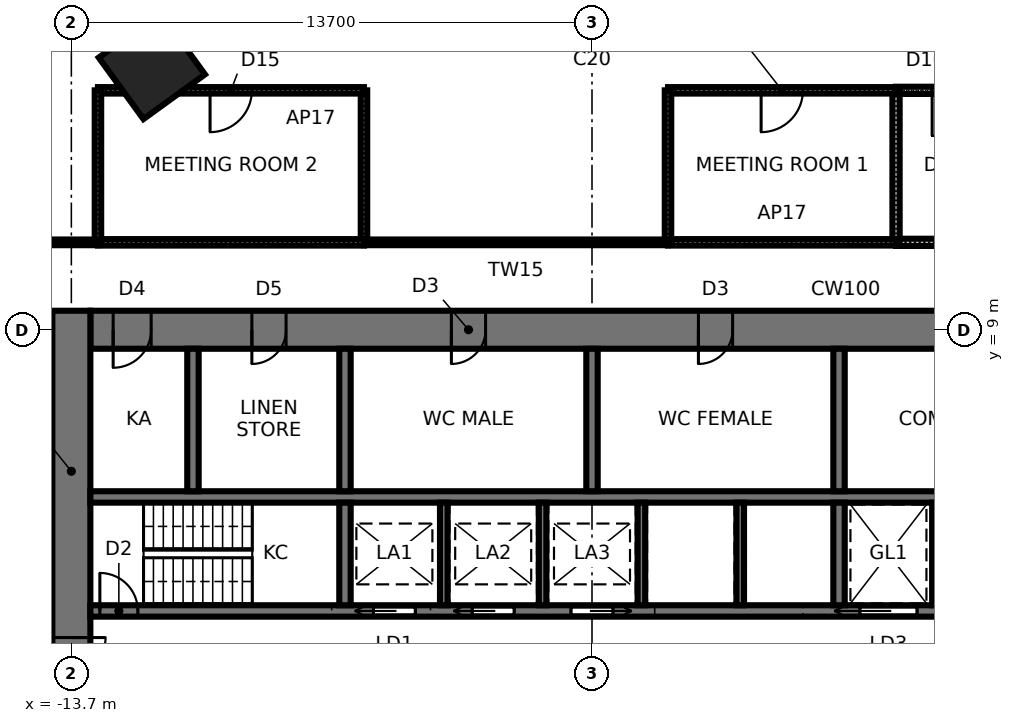
"""IFC4 building model, lengths in metres.
Left out: names, types, materials, properties, quantities, classifications, styles, units other than length and angle.
Written with IfcOpenShell. Run it as: python <this file> out.ifc"""

import sys

from ifc_helpers import new_model, si_unit, direction, frame, frame_2d, origin, origin_2d, place, context, subcontext, project, spatial, rectangle, extrude, element, fill, save


model = new_model("IFC4")
c1 = context("Model", 3, precision=1e-05, world=origin(), true_north=direction((0.0, 1.0)))
c2 = subcontext(c1, "Body", "Model", "MODEL_VIEW")
j1 = project(units=[si_unit("LENGTHUNIT", "METRE"), si_unit("PLANEANGLEUNIT", "RADIAN")], contexts=[c1])
p1 = place(None, origin())
s1 = spatial("IfcSite", under=j1, at=p1, CompositionType="ELEMENT")
p2 = place(p1, origin())
s2 = spatial("IfcBuilding", under=s1, at=p2, CompositionType="ELEMENT")
p3 = place(p2, frame((0.0, 0.0, 32.2)))
s3 = spatial("IfcBuildingStorey", under=s2, at=p3, CompositionType="ELEMENT", Elevation=32.2)
p4 = place(p3, frame((-11.581, 15.94, 0.0), z_axis=(0.0, 0.0, 1.0), x_axis=(-0.587785252292, 0.809016994375, 0.0)))
e1 = element("IfcColumn", 1, at=p4, inside=s3, PredefinedType="COLUMN", context=c2, shape_type="SweptSolid", body=[
    extrude(rectangle(XDim=2.0, YDim=2.0, at=origin_2d()), origin(), (0.0, 0.0, 1.0), 4.2),
])
p5 = place(p3, frame((13.2, 9.0, 0.0), z_axis=(0.0, 0.0, 1.0), x_axis=(-1.0, 0.0, 0.0)))
e2 = element("IfcWall", 2, at=p5, inside=s3, PredefinedType="SHEAR", context=c2, shape_type="SweptSolid", body=[
    extrude(rectangle(XDim=26.4, YDim=1.0, at=frame_2d((13.2, 0.0))), origin(), (0.0, 0.0, 1.0), 4.2),
])
p6 = place(p5, frame((2.65, 0.0, 0.0)))
e3 = element("IfcOpeningElement", 3, at=p6, cuts=e2, PredefinedType="OPENING", context=c2, shape_type="SweptSolid", body=[
    extrude(rectangle(XDim=0.9, YDim=2.1, at=frame_2d((0.45, 1.05))), frame((0.0, 0.51, 0.0), z_axis=(0.0, -1.0, 0.0), x_axis=(1.0, 0.0, 0.0)), (0.0, 0.0, 1.0), 1.02),
])
p7 = place(p5, frame((9.5, 0.0, 0.0)))
e4 = element("IfcOpeningElement", 4, at=p7, cuts=e2, PredefinedType="OPENING", context=c2, shape_type="SweptSolid", body=[
    extrude(rectangle(XDim=0.9, YDim=2.1, at=frame_2d((0.45, 1.05))), frame((0.0, 0.51, 0.0), z_axis=(0.0, -1.0, 0.0), x_axis=(1.0, 0.0, 0.0)), (0.0, 0.0, 1.0), 1.02),
])
p8 = place(p5, frame((16.0, 0.0, 0.0)))
e5 = element("IfcOpeningElement", 5, at=p8, cuts=e2, PredefinedType="OPENING", context=c2, shape_type="SweptSolid", body=[
    extrude(rectangle(XDim=0.9, YDim=2.1, at=frame_2d((0.45, 1.05))), frame((0.0, 0.51, 0.0), z_axis=(0.0, -1.0, 0.0), x_axis=(1.0, 0.0, 0.0)), (0.0, 0.0, 1.0), 1.02),
])
p9 = place(p5, frame((21.25, 0.0, 0.0)))
e6 = element("IfcOpeningElement", 6, at=p9, cuts=e2, PredefinedType="OPENING", context=c2, shape_type="SweptSolid", body=[
    extrude(rectangle(XDim=0.9, YDim=2.1, at=frame_2d((0.45, 1.05))), frame((0.0, 0.51, 0.0), z_axis=(0.0, -1.0, 0.0), x_axis=(1.0, 0.0, 0.0)), (0.0, 0.0, 1.0), 1.02),
])
p10 = place(p5, frame((24.8, 0.0, 0.0)))
e7 = element("IfcOpeningElement", 7, at=p10, cuts=e2, PredefinedType="OPENING", context=c2, shape_type="SweptSolid", body=[
    extrude(rectangle(XDim=1.0, YDim=2.1, at=frame_2d((0.5, 1.05))), frame((0.0, 0.51, 0.0), z_axis=(0.0, -1.0, 0.0), x_axis=(1.0, 0.0, 0.0)), (0.0, 0.0, 1.0), 1.02),
])
p11 = place(p3, frame((-13.7, 9.5, 0.0), z_axis=(0.0, 0.0, 1.0), x_axis=(0.0, -1.0, 0.0)))
e8 = element("IfcWall", 8, at=p11, inside=s3, PredefinedType="SHEAR", context=c2, shape_type="SweptSolid", body=[
    extrude(rectangle(XDim=19.0, YDim=1.0, at=frame_2d((9.5, 0.0))), origin(), (0.0, 0.0, 1.0), 4.2),
])
p12 = place(p11, frame((8.6, 0.0, 0.0)))
e9 = element("IfcOpeningElement", 9, at=p12, cuts=e8, PredefinedType="OPENING", context=c2, shape_type="SweptSolid", body=[
    extrude(rectangle(XDim=1.8, YDim=2.4, at=frame_2d((0.9, 1.2))), frame((0.0, 0.51, 0.0), z_axis=(0.0, -1.0, 0.0), x_axis=(1.0, 0.0, 0.0)), (0.0, 0.0, 1.0), 1.02),
])
p13 = place(p3, frame((-13.2, 1.6, 0.0), z_axis=(0.0, 0.0, 1.0), x_axis=(1.0, 0.0, 0.0)))
e10 = element("IfcWall", 10, at=p13, inside=s3, PredefinedType="SHEAR", context=c2, shape_type="SweptSolid", body=[
    extrude(rectangle(XDim=26.4, YDim=0.3, at=frame_2d((13.2, 0.0))), origin(), (0.0, 0.0, 1.0), 4.2),
])
p14 = place(p13, frame((0.25, 0.0, 0.0)))
e11 = element("IfcOpeningElement", 11, at=p14, cuts=e10, PredefinedType="OPENING", context=c2, shape_type="SweptSolid", body=[
    extrude(rectangle(XDim=1.0, YDim=2.1, at=frame_2d((0.5, 1.05))), frame((0.0, 0.16, 0.0), z_axis=(0.0, -1.0, 0.0), x_axis=(1.0, 0.0, 0.0)), (0.0, 0.0, 1.0), 0.32),
])
p15 = place(p13, frame((20.25, 0.0, 0.0)))
e12 = element("IfcOpeningElement", 12, at=p15, cuts=e10, PredefinedType="OPENING", context=c2, shape_type="SweptSolid", body=[
    extrude(rectangle(XDim=1.5, YDim=2.4, at=frame_2d((0.75, 1.2))), frame((0.0, 0.16, 0.0), z_axis=(0.0, -1.0, 0.0), x_axis=(1.0, 0.0, 0.0)), (0.0, 0.0, 1.0), 0.32),
])
p16 = place(p13, frame((7.45, 0.0, 0.0)))
e13 = element("IfcOpeningElement", 13, at=p16, cuts=e10, PredefinedType="OPENING", context=c2, shape_type="SweptSolid", body=[
    extrude(rectangle(XDim=1.1, YDim=2.3, at=frame_2d((0.55, 1.15))), frame((0.0, 0.16, 0.0), z_axis=(0.0, -1.0, 0.0), x_axis=(1.0, 0.0, 0.0)), (0.0, 0.0, 1.0), 0.32),
])
p17 = place(p13, frame((10.05, 0.0, 0.0)))
e14 = element("IfcOpeningElement", 14, at=p17, cuts=e10, PredefinedType="OPENING", context=c2, shape_type="SweptSolid", body=[
    extrude(rectangle(XDim=1.1, YDim=2.3, at=frame_2d((0.55, 1.15))), frame((0.0, 0.16, 0.0), z_axis=(0.0, -1.0, 0.0), x_axis=(1.0, 0.0, 0.0)), (0.0, 0.0, 1.0), 0.32),
])
p18 = place(p13, frame((12.65, 0.0, 0.0)))
e15 = element("IfcOpeningElement", 15, at=p18, cuts=e10, PredefinedType="OPENING", context=c2, shape_type="SweptSolid", body=[
    extrude(rectangle(XDim=1.1, YDim=2.3, at=frame_2d((0.55, 1.15))), frame((0.0, 0.16, 0.0), z_axis=(0.0, -1.0, 0.0), x_axis=(1.0, 0.0, 0.0)), (0.0, 0.0, 1.0), 0.32),
])
p19 = place(p13, frame((24.15, 0.0, 0.0)))
e16 = element("IfcOpeningElement", 16, at=p19, cuts=e10, PredefinedType="OPENING", context=c2, shape_type="SweptSolid", body=[
    extrude(rectangle(XDim=0.9, YDim=2.1, at=frame_2d((0.45, 1.05))), frame((0.0, 0.16, 0.0), z_axis=(0.0, -1.0, 0.0), x_axis=(1.0, 0.0, 0.0)), (0.0, 0.0, 1.0), 0.32),
])
p20 = place(p3, frame((-13.2, 4.6, 0.0), z_axis=(0.0, 0.0, 1.0), x_axis=(1.0, 0.0, 0.0)))
e17 = element("IfcWall", 17, at=p20, inside=s3, PredefinedType="SHEAR", context=c2, shape_type="SweptSolid", body=[
    extrude(rectangle(XDim=26.4, YDim=0.3, at=frame_2d((13.2, 0.0))), origin(), (0.0, 0.0, 1.0), 4.2),
])
p21 = place(p3, frame((-6.5, 1.75, 0.0), z_axis=(0.0, 0.0, 1.0), x_axis=(0.0, 1.0, 0.0)))
e18 = element("IfcWall", 18, at=p21, inside=s3, PredefinedType="SHEAR", context=c2, shape_type="SweptSolid", body=[
    extrude(rectangle(XDim=2.7, YDim=0.3, at=frame_2d((1.35, 0.0))), origin(), (0.0, 0.0, 1.0), 4.2),
])
p22 = place(p3, frame((-6.5, 4.75, 0.0), z_axis=(0.0, 0.0, 1.0), x_axis=(0.0, 1.0, 0.0)))
e19 = element("IfcWall", 19, at=p22, inside=s3, PredefinedType="SHEAR", context=c2, shape_type="SweptSolid", body=[
    extrude(rectangle(XDim=3.75, YDim=0.3, at=frame_2d((1.875, 0.0))), origin(), (0.0, 0.0, 1.0), 4.2),
])
p23 = place(p3, frame((6.5, 1.75, 0.0), z_axis=(0.0, 0.0, 1.0), x_axis=(0.0, 1.0, 0.0)))
e20 = element("IfcWall", 20, at=p23, inside=s3, PredefinedType="SHEAR", context=c2, shape_type="SweptSolid", body=[
    extrude(rectangle(XDim=2.7, YDim=0.3, at=frame_2d((1.35, 0.0))), origin(), (0.0, 0.0, 1.0), 4.2),
])
p24 = place(p3, frame((6.5, 4.75, 0.0), z_axis=(0.0, 0.0, 1.0), x_axis=(0.0, 1.0, 0.0)))
e21 = element("IfcWall", 21, at=p24, inside=s3, PredefinedType="SHEAR", context=c2, shape_type="SweptSolid", body=[
    extrude(rectangle(XDim=3.75, YDim=0.3, at=frame_2d((1.875, 0.0))), origin(), (0.0, 0.0, 1.0), 4.2),
])
for number, where, z_axis, x_axis in (
    (22, (-3.9, 1.75, 0.0), (0.0, 0.0, 1.0), (0.0, 1.0, 0.0)),
    (23, (-1.3, 1.75, 0.0), (0.0, 0.0, 1.0), (0.0, 1.0, 0.0)),
    (24, (1.3, 1.75, 0.0), (0.0, 0.0, 1.0), (0.0, 1.0, 0.0)),
    (25, (3.9, 1.75, 0.0), (0.0, 0.0, 1.0), (0.0, 1.0, 0.0)),
):
    element("IfcWall", number, at=place(p3, frame(where, z_axis=z_axis, x_axis=x_axis)), inside=s3, PredefinedType="SHEAR", context=c2, shape_type="SweptSolid", body=[
        extrude(rectangle(XDim=2.7, YDim=0.2, at=frame_2d((1.35, 0.0))), origin(), (0.0, 0.0, 1.0), 4.2),
    ])
for number, where, z_axis, x_axis in (
    (26, (0.0, 4.75, 0.0), (0.0, 0.0, 1.0), (0.0, 1.0, 0.0)),
    (27, (-10.5, 4.75, 0.0), (0.0, 0.0, 1.0), (0.0, 1.0, 0.0)),
):
    element("IfcWall", number, at=place(p3, frame(where, z_axis=z_axis, x_axis=x_axis)), inside=s3, PredefinedType="SHEAR", context=c2, shape_type="SweptSolid", body=[
        extrude(rectangle(XDim=3.75, YDim=0.3, at=frame_2d((1.875, 0.0))), origin(), (0.0, 0.0, 1.0), 4.2),
    ])
p25 = place(p3, frame((9.1, 1.75, 0.0), z_axis=(0.0, 0.0, 1.0), x_axis=(0.0, 1.0, 0.0)))
e28 = element("IfcWall", 28, at=p25, inside=s3, PredefinedType="SHEAR", context=c2, shape_type="SweptSolid", body=[
    extrude(rectangle(XDim=2.7, YDim=0.3, at=frame_2d((1.35, 0.0))), origin(), (0.0, 0.0, 1.0), 4.2),
])
p26 = place(p3, frame((8.0, 11.3, 0.0), z_axis=(0.0, 0.0, 1.0), x_axis=(1.0, 0.0, 0.0)))
e29 = element("IfcWall", 29, at=p26, inside=s3, PredefinedType="SOLIDWALL", context=c2, shape_type="SweptSolid", body=[
    extrude(rectangle(XDim=5.0, YDim=0.19, at=frame_2d((2.5, 0.0))), origin(), (0.0, 0.0, 1.0), 4.04),
])
p27 = place(p3, frame((13.0, 15.3, 0.0), z_axis=(0.0, 0.0, 1.0), x_axis=(-1.0, 0.0, 0.0)))
e30 = element("IfcWall", 30, at=p27, inside=s3, PredefinedType="SOLIDWALL", context=c2, shape_type="SweptSolid", body=[
    extrude(rectangle(XDim=5.0, YDim=0.19, at=frame_2d((2.5, 0.0))), origin(), (0.0, 0.0, 1.0), 4.04),
])
p28 = place(p27, frame((2.85, 0.0, 0.0)))
e31 = element("IfcOpeningElement", 31, at=p28, cuts=e30, PredefinedType="OPENING", context=c2, shape_type="SweptSolid", body=[
    extrude(rectangle(XDim=1.2, YDim=2.1, at=frame_2d((0.6, 1.05))), frame((0.0, 0.105, 0.0), z_axis=(0.0, -1.0, 0.0), x_axis=(1.0, 0.0, 0.0)), (0.0, 0.0, 1.0), 0.21),
])
p29 = place(p3, frame((8.0, 15.3, 0.0), z_axis=(0.0, 0.0, 1.0), x_axis=(0.0, -1.0, 0.0)))
e32 = element("IfcWall", 32, at=p29, inside=s3, PredefinedType="SOLIDWALL", context=c2, shape_type="SweptSolid", body=[
    extrude(rectangle(XDim=4.0, YDim=0.19, at=frame_2d((2.0, 0.0))), origin(), (0.0, 0.0, 1.0), 4.04),
])
p30 = place(p3, frame((2.0, 11.3, 0.0), z_axis=(0.0, 0.0, 1.0), x_axis=(1.0, 0.0, 0.0)))
e33 = element("IfcWall", 33, at=p30, inside=s3, PredefinedType="PARTITIONING", context=c2, shape_type="SweptSolid", body=[
    extrude(rectangle(XDim=6.0, YDim=0.17, at=frame_2d((3.0, 0.0))), origin(), (0.0, 0.0, 1.0), 4.04),
])
p31 = place(p3, frame((8.0, 15.3, 0.0), z_axis=(0.0, 0.0, 1.0), x_axis=(-1.0, 0.0, 0.0)))
e34 = element("IfcWall", 34, at=p31, inside=s3, PredefinedType="PARTITIONING", context=c2, shape_type="SweptSolid", body=[
    extrude(rectangle(XDim=6.0, YDim=0.17, at=frame_2d((3.0, 0.0))), origin(), (0.0, 0.0, 1.0), 4.04),
])
p32 = place(p31, frame((2.45, 0.0, 0.0)))
e35 = element("IfcOpeningElement", 35, at=p32, cuts=e34, PredefinedType="OPENING", context=c2, shape_type="SweptSolid", body=[
    extrude(rectangle(XDim=1.1, YDim=2.4, at=frame_2d((0.55, 1.2))), frame((0.0, 0.095, 0.0), z_axis=(0.0, -1.0, 0.0), x_axis=(1.0, 0.0, 0.0)), (0.0, 0.0, 1.0), 0.19),
])
p33 = place(p3, frame((2.0, 15.3, 0.0), z_axis=(0.0, 0.0, 1.0), x_axis=(0.0, -1.0, 0.0)))
e36 = element("IfcWall", 36, at=p33, inside=s3, PredefinedType="PARTITIONING", context=c2, shape_type="SweptSolid", body=[
    extrude(rectangle(XDim=4.0, YDim=0.17, at=frame_2d((2.0, 0.0))), origin(), (0.0, 0.0, 1.0), 4.04),
])
p34 = place(p3, frame((2.0, 11.3, 0.0), z_axis=(0.0, 0.0, 1.0), x_axis=(-1.0, 0.0, 0.0)))
e37 = element("IfcWall", 37, at=p34, inside=s3, PredefinedType="PARTITIONING", context=c2, shape_type="SweptSolid", body=[
    extrude(rectangle(XDim=8.0, YDim=0.15, at=frame_2d((4.0, 0.0))), origin(), (0.0, 0.0, 1.0), 4.04),
])
p35 = place(p3, frame((-6.0, 11.3, 0.0), z_axis=(0.0, 0.0, 1.0), x_axis=(0.0, 1.0, 0.0)))
e38 = element("IfcWall", 38, at=p35, inside=s3, PredefinedType="PARTITIONING", context=c2, shape_type="SweptSolid", body=[
    extrude(rectangle(XDim=4.0, YDim=0.17, at=frame_2d((2.0, 0.0))), origin(), (0.0, 0.0, 1.0), 4.04),
])
p36 = place(p3, frame((-6.0, 15.3, 0.0), z_axis=(0.0, 0.0, 1.0), x_axis=(-1.0, 0.0, 0.0)))
e39 = element("IfcWall", 39, at=p36, inside=s3, PredefinedType="PARTITIONING", context=c2, shape_type="SweptSolid", body=[
    extrude(rectangle(XDim=7.0, YDim=0.17, at=frame_2d((3.5, 0.0))), origin(), (0.0, 0.0, 1.0), 4.04),
])
p37 = place(p36, frame((2.95, 0.0, 0.0)))
e40 = element("IfcOpeningElement", 40, at=p37, cuts=e39, PredefinedType="OPENING", context=c2, shape_type="SweptSolid", body=[
    extrude(rectangle(XDim=1.1, YDim=2.4, at=frame_2d((0.55, 1.2))), frame((0.0, 0.095, 0.0), z_axis=(0.0, -1.0, 0.0), x_axis=(1.0, 0.0, 0.0)), (0.0, 0.0, 1.0), 0.19),
])
p38 = place(p3, frame((-13.0, 11.3, 0.0), z_axis=(0.0, 0.0, 1.0), x_axis=(1.0, 0.0, 0.0)))
e41 = element("IfcWall", 41, at=p38, inside=s3, PredefinedType="PARTITIONING", context=c2, shape_type="SweptSolid", body=[
    extrude(rectangle(XDim=7.0, YDim=0.17, at=frame_2d((3.5, 0.0))), origin(), (0.0, 0.0, 1.0), 4.04),
])
p39 = place(p3, frame((-13.0, 15.3, 0.0), z_axis=(0.0, 0.0, 1.0), x_axis=(0.0, -1.0, 0.0)))
e42 = element("IfcWall", 42, at=p39, inside=s3, PredefinedType="PARTITIONING", context=c2, shape_type="SweptSolid", body=[
    extrude(rectangle(XDim=4.0, YDim=0.17, at=frame_2d((2.0, 0.0))), origin(), (0.0, 0.0, 1.0), 4.04),
])
p40 = place(p3, frame((-13.0, 11.3, 0.0), z_axis=(0.0, 0.0, 1.0), x_axis=(-1.0, 0.0, 0.0)))
e43 = element("IfcWall", 43, at=p40, inside=s3, PredefinedType="PARTITIONING", context=c2, shape_type="SweptSolid", body=[
    extrude(rectangle(XDim=3.0, YDim=0.15, at=frame_2d((1.5, 0.0))), origin(), (0.0, 0.0, 1.0), 4.04),
])
p41 = place(p12, origin())
e44 = element("IfcDoor", 44, at=p41, inside=s3, OperationType="DOUBLE_DOOR_SINGLE_SWING", PredefinedType="DOOR", context=c2, shape_type="SweptSolid", body=[
    extrude(rectangle(XDim=1.72, YDim=2.36, at=frame_2d((0.9, 1.18))), frame((0.0, 0.025, 0.0), z_axis=(0.0, -1.0, 0.0), x_axis=(1.0, 0.0, 0.0)), (0.0, 0.0, 1.0), 0.05),
    extrude(rectangle(XDim=0.04, YDim=2.4, at=frame_2d((0.02, 1.2))), frame((0.0, 0.25, 0.0), z_axis=(0.0, -1.0, 0.0), x_axis=(1.0, 0.0, 0.0)), (0.0, 0.0, 1.0), 0.5),
    extrude(rectangle(XDim=0.04, YDim=2.4, at=frame_2d((1.78, 1.2))), frame((0.0, 0.25, 0.0), z_axis=(0.0, -1.0, 0.0), x_axis=(1.0, 0.0, 0.0)), (0.0, 0.0, 1.0), 0.5),
    extrude(rectangle(XDim=1.72, YDim=0.04, at=frame_2d((0.9, 2.38))), frame((0.0, 0.25, 0.0), z_axis=(0.0, -1.0, 0.0), x_axis=(1.0, 0.0, 0.0)), (0.0, 0.0, 1.0), 0.5),
])
fill(e9, e44)
p42 = place(p14, origin())
e45 = element("IfcDoor", 45, at=p42, inside=s3, OperationType="SINGLE_SWING_LEFT", PredefinedType="DOOR", context=c2, shape_type="SweptSolid", body=[
    extrude(rectangle(XDim=1.0, YDim=2.1, at=frame_2d((0.5, 1.05))), frame((0.0, 0.025, 0.0), z_axis=(0.0, -1.0, 0.0), x_axis=(1.0, 0.0, 0.0)), (0.0, 0.0, 1.0), 0.05),
])
fill(e11, e45)
p43 = place(p15, origin())
e46 = element("IfcDoor", 46, at=p43, inside=s3, OperationType="SLIDING_TO_LEFT", PredefinedType="DOOR", context=c2, shape_type="SweptSolid", body=[
    extrude(rectangle(XDim=1.5, YDim=2.4, at=frame_2d((0.75, 1.2))), frame((0.0, 0.025, 0.0), z_axis=(0.0, -1.0, 0.0), x_axis=(1.0, 0.0, 0.0)), (0.0, 0.0, 1.0), 0.05),
])
fill(e12, e46)
p44 = place(p16, origin())
e47 = element("IfcDoor", 47, at=p44, inside=s3, OperationType="SLIDING_TO_LEFT", PredefinedType="DOOR", context=c2, shape_type="SweptSolid", body=[
    extrude(rectangle(XDim=1.1, YDim=2.3, at=frame_2d((0.55, 1.15))), frame((0.0, 0.025, 0.0), z_axis=(0.0, -1.0, 0.0), x_axis=(1.0, 0.0, 0.0)), (0.0, 0.0, 1.0), 0.05),
])
fill(e13, e47)
p45 = place(p17, origin())
e48 = element("IfcDoor", 48, at=p45, inside=s3, OperationType="SLIDING_TO_LEFT", PredefinedType="DOOR", context=c2, shape_type="SweptSolid", body=[
    extrude(rectangle(XDim=1.1, YDim=2.3, at=frame_2d((0.55, 1.15))), frame((0.0, 0.025, 0.0), z_axis=(0.0, -1.0, 0.0), x_axis=(1.0, 0.0, 0.0)), (0.0, 0.0, 1.0), 0.05),
])
fill(e14, e48)
p46 = place(p18, origin())
e49 = element("IfcDoor", 49, at=p46, inside=s3, OperationType="SLIDING_TO_RIGHT", PredefinedType="DOOR", context=c2, shape_type="SweptSolid", body=[
    extrude(rectangle(XDim=1.1, YDim=2.3, at=frame_2d((0.55, 1.15))), frame((0.0, 0.025, 0.0), z_axis=(0.0, -1.0, 0.0), x_axis=(1.0, 0.0, 0.0)), (0.0, 0.0, 1.0), 0.05),
])
fill(e15, e49)
p47 = place(p7, origin())
e50 = element("IfcDoor", 50, at=p47, inside=s3, OperationType="SINGLE_SWING_RIGHT", PredefinedType="DOOR", context=c2, shape_type="SweptSolid", body=[
    extrude(rectangle(XDim=0.82, YDim=2.06, at=frame_2d((0.45, 1.03))), frame((0.0, 0.025, 0.0), z_axis=(0.0, -1.0, 0.0), x_axis=(1.0, 0.0, 0.0)), (0.0, 0.0, 1.0), 0.05),
    extrude(rectangle(XDim=0.04, YDim=2.1, at=frame_2d((0.02, 1.05))), frame((0.0, 0.25, 0.0), z_axis=(0.0, -1.0, 0.0), x_axis=(1.0, 0.0, 0.0)), (0.0, 0.0, 1.0), 0.5),
    extrude(rectangle(XDim=0.04, YDim=2.1, at=frame_2d((0.88, 1.05))), frame((0.0, 0.25, 0.0), z_axis=(0.0, -1.0, 0.0), x_axis=(1.0, 0.0, 0.0)), (0.0, 0.0, 1.0), 0.5),
    extrude(rectangle(XDim=0.82, YDim=0.04, at=frame_2d((0.45, 2.08))), frame((0.0, 0.25, 0.0), z_axis=(0.0, -1.0, 0.0), x_axis=(1.0, 0.0, 0.0)), (0.0, 0.0, 1.0), 0.5),
])
fill(e4, e50)
p48 = place(p8, origin())
e51 = element("IfcDoor", 51, at=p48, inside=s3, OperationType="SINGLE_SWING_RIGHT", PredefinedType="DOOR", context=c2, shape_type="SweptSolid", body=[
    extrude(rectangle(XDim=0.82, YDim=2.06, at=frame_2d((0.45, 1.03))), frame((0.0, 0.025, 0.0), z_axis=(0.0, -1.0, 0.0), x_axis=(1.0, 0.0, 0.0)), (0.0, 0.0, 1.0), 0.05),
    extrude(rectangle(XDim=0.04, YDim=2.1, at=frame_2d((0.02, 1.05))), frame((0.0, 0.25, 0.0), z_axis=(0.0, -1.0, 0.0), x_axis=(1.0, 0.0, 0.0)), (0.0, 0.0, 1.0), 0.5),
    extrude(rectangle(XDim=0.04, YDim=2.1, at=frame_2d((0.88, 1.05))), frame((0.0, 0.25, 0.0), z_axis=(0.0, -1.0, 0.0), x_axis=(1.0, 0.0, 0.0)), (0.0, 0.0, 1.0), 0.5),
    extrude(rectangle(XDim=0.82, YDim=0.04, at=frame_2d((0.45, 2.08))), frame((0.0, 0.25, 0.0), z_axis=(0.0, -1.0, 0.0), x_axis=(1.0, 0.0, 0.0)), (0.0, 0.0, 1.0), 0.5),
])
fill(e5, e51)
p49 = place(p9, origin())
e52 = element("IfcDoor", 52, at=p49, inside=s3, OperationType="SINGLE_SWING_RIGHT", PredefinedType="DOOR", context=c2, shape_type="SweptSolid", body=[
    extrude(rectangle(XDim=0.82, YDim=2.06, at=frame_2d((0.45, 1.03))), frame((0.0, 0.025, 0.0), z_axis=(0.0, -1.0, 0.0), x_axis=(1.0, 0.0, 0.0)), (0.0, 0.0, 1.0), 0.05),
    extrude(rectangle(XDim=0.04, YDim=2.1, at=frame_2d((0.02, 1.05))), frame((0.0, 0.25, 0.0), z_axis=(0.0, -1.0, 0.0), x_axis=(1.0, 0.0, 0.0)), (0.0, 0.0, 1.0), 0.5),
    extrude(rectangle(XDim=0.04, YDim=2.1, at=frame_2d((0.88, 1.05))), frame((0.0, 0.25, 0.0), z_axis=(0.0, -1.0, 0.0), x_axis=(1.0, 0.0, 0.0)), (0.0, 0.0, 1.0), 0.5),
    extrude(rectangle(XDim=0.82, YDim=0.04, at=frame_2d((0.45, 2.08))), frame((0.0, 0.25, 0.0), z_axis=(0.0, -1.0, 0.0), x_axis=(1.0, 0.0, 0.0)), (0.0, 0.0, 1.0), 0.5),
])
fill(e6, e52)
p50 = place(p10, origin())
e53 = element("IfcDoor", 53, at=p50, inside=s3, OperationType="SINGLE_SWING_RIGHT", PredefinedType="DOOR", context=c2, shape_type="SweptSolid", body=[
    extrude(rectangle(XDim=0.92, YDim=2.06, at=frame_2d((0.5, 1.03))), frame((0.0, 0.025, 0.0), z_axis=(0.0, -1.0, 0.0), x_axis=(1.0, 0.0, 0.0)), (0.0, 0.0, 1.0), 0.05),
    extrude(rectangle(XDim=0.04, YDim=2.1, at=frame_2d((0.02, 1.05))), frame((0.0, 0.25, 0.0), z_axis=(0.0, -1.0, 0.0), x_axis=(1.0, 0.0, 0.0)), (0.0, 0.0, 1.0), 0.5),
    extrude(rectangle(XDim=0.04, YDim=2.1, at=frame_2d((0.98, 1.05))), frame((0.0, 0.25, 0.0), z_axis=(0.0, -1.0, 0.0), x_axis=(1.0, 0.0, 0.0)), (0.0, 0.0, 1.0), 0.5),
    extrude(rectangle(XDim=0.92, YDim=0.04, at=frame_2d((0.5, 2.08))), frame((0.0, 0.25, 0.0), z_axis=(0.0, -1.0, 0.0), x_axis=(1.0, 0.0, 0.0)), (0.0, 0.0, 1.0), 0.5),
])
fill(e7, e53)
p51 = place(p32, origin())
e54 = element("IfcDoor", 54, at=p51, inside=s3, OperationType="SINGLE_SWING_RIGHT", PredefinedType="DOOR", context=c2, shape_type="SweptSolid", body=[
    extrude(rectangle(XDim=1.1, YDim=2.4, at=frame_2d((0.55, 1.2))), frame((0.0, 0.025, 0.0), z_axis=(0.0, -1.0, 0.0), x_axis=(1.0, 0.0, 0.0)), (0.0, 0.0, 1.0), 0.05),
])
fill(e35, e54)
p52 = place(p28, origin())
e55 = element("IfcDoor", 55, at=p52, inside=s3, OperationType="SINGLE_SWING_RIGHT", PredefinedType="DOOR", context=c2, shape_type="SweptSolid", body=[
    extrude(rectangle(XDim=1.2, YDim=2.1, at=frame_2d((0.6, 1.05))), frame((0.0, 0.025, 0.0), z_axis=(0.0, -1.0, 0.0), x_axis=(1.0, 0.0, 0.0)), (0.0, 0.0, 1.0), 0.05),
])
fill(e31, e55)
p53 = place(p37, origin())
e56 = element("IfcDoor", 56, at=p53, inside=s3, OperationType="SINGLE_SWING_RIGHT", PredefinedType="DOOR", context=c2, shape_type="SweptSolid", body=[
    extrude(rectangle(XDim=1.1, YDim=2.4, at=frame_2d((0.55, 1.2))), frame((0.0, 0.025, 0.0), z_axis=(0.0, -1.0, 0.0), x_axis=(1.0, 0.0, 0.0)), (0.0, 0.0, 1.0), 0.05),
])
fill(e40, e56)
save(model, sys.argv[1])
